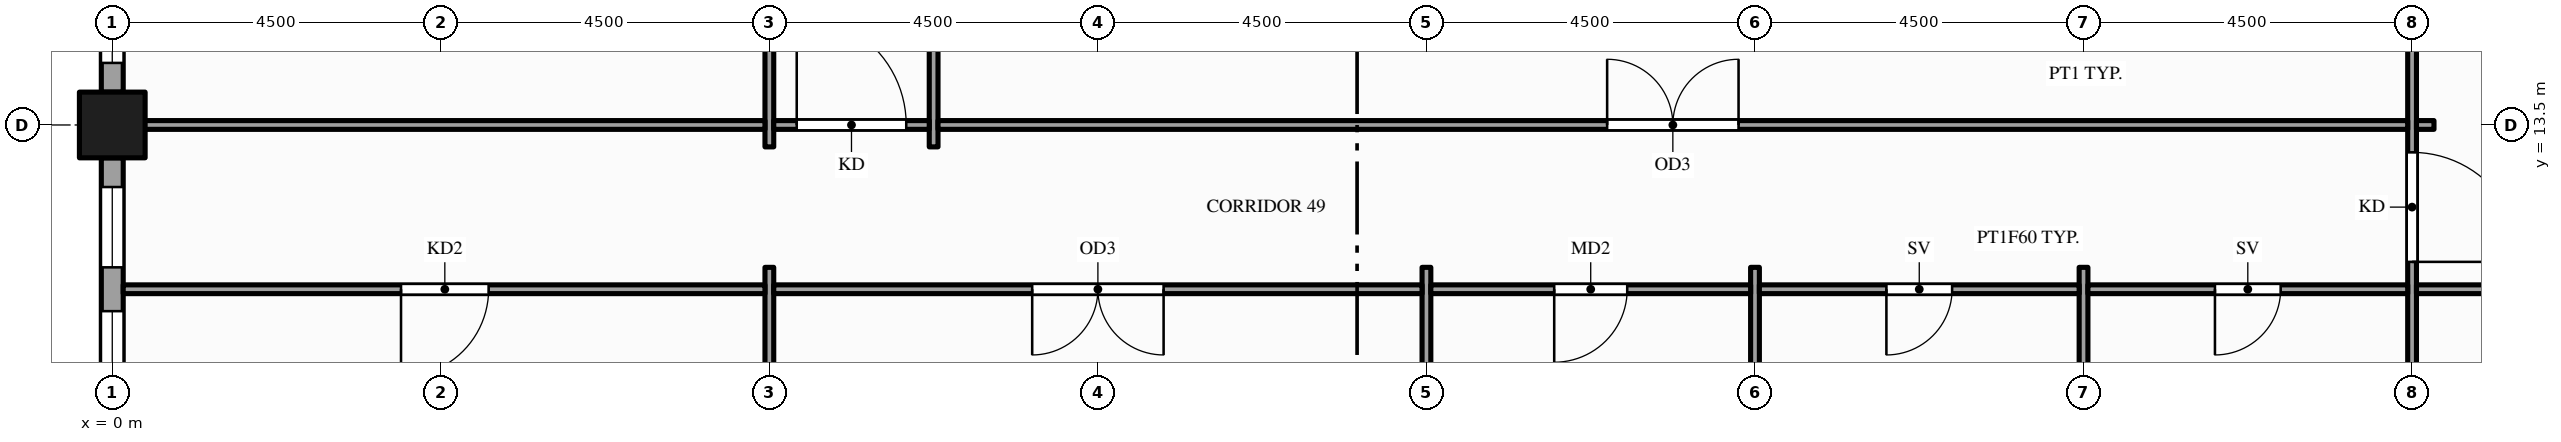
"""IFC4 building model, lengths in metres.
Left out: names, types, materials, properties, quantities, classifications, styles, units other than length and angle.
Written with IfcOpenShell. Run it as: python <this file> out.ifc"""

import sys

from ifc_helpers import new_model, si_unit, direction, frame, frame_2d, origin, origin_2d, place, context, subcontext, project, spatial, rectangle, hollow_rectangle, extrude, element, fill, save


model = new_model("IFC4")
c1 = context("Model", 3, precision=1e-05, world=origin(), true_north=direction((0.0, 1.0)))
c2 = subcontext(c1, "Body", "Model", "MODEL_VIEW")
j1 = project(units=[si_unit("LENGTHUNIT", "METRE"), si_unit("PLANEANGLEUNIT", "RADIAN")], contexts=[c1])
p1 = place(None, origin())
s1 = spatial("IfcSite", under=j1, at=p1, CompositionType="ELEMENT")
p2 = place(p1, origin())
s2 = spatial("IfcBuilding", under=s1, at=p2, CompositionType="ELEMENT")
p3 = place(p2, frame((0.0, 0.0, 155.0)))
s3 = spatial("IfcBuildingStorey", under=s2, at=p3, CompositionType="ELEMENT", Elevation=155.0)
p4 = place(p3, frame((0.0, 13.5, -0.15), z_axis=(0.0, 0.0, 1.0), x_axis=(1.0, 0.0, 0.0)))
e1 = element("IfcColumn", 1, at=p4, inside=s3, PredefinedType="COLUMN", context=c2, shape_type="SweptSolid", body=[
    extrude(hollow_rectangle(XDim=0.9, YDim=0.9, WallThickness=0.045, at=origin_2d()), origin(), (0.0, 0.0, 1.0), 4.0),
])
p5 = place(p3, frame((0.0, 17.55, 0.0), z_axis=(0.0, 0.0, 1.0), x_axis=(0.0, -1.0, 0.0)))
e2 = element("IfcWall", 2, at=p5, inside=s3, PredefinedType="STANDARD", context=c2, shape_type="SweptSolid", body=[
    extrude(rectangle(XDim=3.6, YDim=0.3, at=frame_2d((1.8, 0.0))), origin(), (0.0, 0.0, 1.0), 3.149),
])
p6 = place(p5, frame((0.4, 0.0, 0.9)))
e3 = element("IfcOpeningElement", 3, at=p6, cuts=e2, PredefinedType="OPENING", context=c2, shape_type="SweptSolid", body=[
    extrude(rectangle(XDim=1.1, YDim=2.0, at=frame_2d((0.55, 1.0))), frame((0.0, 0.16, 0.0), z_axis=(0.0, -1.0, 0.0), x_axis=(1.0, 0.0, 0.0)), (0.0, 0.0, 1.0), 0.32),
])
p7 = place(p5, frame((2.1, 0.0, 0.9)))
e4 = element("IfcOpeningElement", 4, at=p7, cuts=e2, PredefinedType="OPENING", context=c2, shape_type="SweptSolid", body=[
    extrude(rectangle(XDim=1.1, YDim=2.0, at=frame_2d((0.55, 1.0))), frame((0.0, 0.16, 0.0), z_axis=(0.0, -1.0, 0.0), x_axis=(1.0, 0.0, 0.0)), (0.0, 0.0, 1.0), 0.32),
])
p8 = place(p3, frame((0.0, 13.05, 0.0), z_axis=(0.0, 0.0, 1.0), x_axis=(0.0, -1.0, 0.0)))
e5 = element("IfcWall", 5, at=p8, inside=s3, PredefinedType="STANDARD", context=c2, shape_type="SweptSolid", body=[
    extrude(rectangle(XDim=3.6, YDim=0.3, at=frame_2d((1.8, 0.0))), origin(), (0.0, 0.0, 1.0), 3.149),
])
p9 = place(p8, frame((0.4, 0.0, 0.9)))
e6 = element("IfcOpeningElement", 6, at=p9, cuts=e5, PredefinedType="OPENING", context=c2, shape_type="SweptSolid", body=[
    extrude(rectangle(XDim=1.1, YDim=2.0, at=frame_2d((0.55, 1.0))), frame((0.0, 0.16, 0.0), z_axis=(0.0, -1.0, 0.0), x_axis=(1.0, 0.0, 0.0)), (0.0, 0.0, 1.0), 0.32),
])
p10 = place(p8, frame((2.1, 0.0, 0.9)))
e7 = element("IfcOpeningElement", 7, at=p10, cuts=e5, PredefinedType="OPENING", context=c2, shape_type="SweptSolid", body=[
    extrude(rectangle(XDim=1.1, YDim=2.0, at=frame_2d((0.55, 1.0))), frame((0.0, 0.16, 0.0), z_axis=(0.0, -1.0, 0.0), x_axis=(1.0, 0.0, 0.0)), (0.0, 0.0, 1.0), 0.32),
])
p11 = place(p3, frame((9.0, 3.875, 0.0), z_axis=(0.0, 0.0, 1.0), x_axis=(0.0, 1.0, 0.0)))
e8 = element("IfcWall", 8, at=p11, inside=s3, PredefinedType="PARTITIONING", context=c2, shape_type="SweptSolid", body=[
    extrude(rectangle(XDim=7.675, YDim=0.12, at=frame_2d((3.837, 0.0))), origin(), (0.0, 0.0, 1.0), 2.87),
])
p12 = place(p3, frame((9.0, 13.2, 0.0), z_axis=(0.0, 0.0, 1.0), x_axis=(0.0, 1.0, 0.0)))
e9 = element("IfcWall", 9, at=p12, inside=s3, PredefinedType="PARTITIONING", context=c2, shape_type="SweptSolid", body=[
    extrude(rectangle(XDim=18.6, YDim=0.12, at=frame_2d((9.3, 0.0))), origin(), (0.0, 0.0, 1.0), 2.6),
])
p13 = place(p12, frame((3.175, 0.0, 0.0)))
e10 = element("IfcOpeningElement", 10, at=p13, cuts=e9, PredefinedType="OPENING", context=c2, shape_type="SweptSolid", body=[
    extrude(rectangle(XDim=1.0, YDim=2.1, at=frame_2d((0.5, 1.05))), frame((0.0, 0.07, 0.0), z_axis=(0.0, -1.0, 0.0), x_axis=(1.0, 0.0, 0.0)), (0.0, 0.0, 1.0), 0.14),
])
p14 = place(p12, frame((9.955, 0.0, 0.0)))
e11 = element("IfcOpeningElement", 11, at=p14, cuts=e9, PredefinedType="OPENING", context=c2, shape_type="SweptSolid", body=[
    extrude(rectangle(XDim=1.0, YDim=2.1, at=frame_2d((0.5, 1.05))), frame((0.0, 0.07, 0.0), z_axis=(0.0, -1.0, 0.0), x_axis=(1.0, 0.0, 0.0)), (0.0, 0.0, 1.0), 0.14),
])
p15 = place(p3, frame((11.25, 13.2, 0.0), z_axis=(0.0, 0.0, 1.0), x_axis=(0.0, 1.0, 0.0)))
e12 = element("IfcWall", 12, at=p15, inside=s3, PredefinedType="PARTITIONING", context=c2, shape_type="SweptSolid", body=[
    extrude(rectangle(XDim=18.6, YDim=0.12, at=frame_2d((9.3, 0.0))), origin(), (0.0, 0.0, 1.0), 2.6),
])
p16 = place(p15, frame((4.2, 0.0, 0.0)))
e13 = element("IfcOpeningElement", 13, at=p16, cuts=e12, PredefinedType="OPENING", context=c2, shape_type="SweptSolid", body=[
    extrude(rectangle(XDim=1.2, YDim=2.1, at=frame_2d((0.6, 1.05))), frame((0.0, 0.07, 0.0), z_axis=(0.0, -1.0, 0.0), x_axis=(1.0, 0.0, 0.0)), (0.0, 0.0, 1.0), 0.14),
])
p17 = place(p3, frame((18.0, 0.15, 0.0), z_axis=(0.0, 0.0, 1.0), x_axis=(0.0, 1.0, 0.0)))
e14 = element("IfcWall", 14, at=p17, inside=s3, PredefinedType="PARTITIONING", context=c2, shape_type="SweptSolid", body=[
    extrude(rectangle(XDim=11.4, YDim=0.12, at=frame_2d((5.7, 0.0))), origin(), (0.0, 0.0, 1.0), 2.87),
])
for number, where, z_axis, x_axis in (
    (15, (22.5, 1.65, 0.0), (0.0, 0.0, 1.0), (0.0, 1.0, 0.0)),
    (16, (27.0, 1.65, 0.0), (0.0, 0.0, 1.0), (0.0, 1.0, 0.0)),
):
    element("IfcWall", number, at=place(p3, frame(where, z_axis=z_axis, x_axis=x_axis)), inside=s3, PredefinedType="PARTITIONING", context=c2, shape_type="SweptSolid", body=[
        extrude(rectangle(XDim=9.9, YDim=0.12, at=frame_2d((4.95, 0.0))), origin(), (0.0, 0.0, 1.0), 2.87),
    ])
p18 = place(p3, frame((31.5, 1.65, 0.0), z_axis=(0.0, 0.0, 1.0), x_axis=(0.0, 1.0, 0.0)))
e17 = element("IfcWall", 17, at=p18, inside=s3, PredefinedType="PARTITIONING", context=c2, shape_type="SweptSolid", body=[
    extrude(rectangle(XDim=22.2, YDim=0.12, at=frame_2d((11.1, 0.0))), origin(), (0.0, 0.0, 1.0), 2.87),
])
p19 = place(p18, frame((9.975, 0.0, 0.0)))
e18 = element("IfcOpeningElement", 18, at=p19, cuts=e17, PredefinedType="OPENING", context=c2, shape_type="SweptSolid", body=[
    extrude(rectangle(XDim=1.5, YDim=2.1, at=frame_2d((0.75, 1.05))), frame((0.0, 0.07, 0.0), z_axis=(0.0, -1.0, 0.0), x_axis=(1.0, 0.0, 0.0)), (0.0, 0.0, 1.0), 0.14),
])
p20 = place(p3, frame((0.15, 11.25, 0.0), z_axis=(0.0, 0.0, 1.0), x_axis=(1.0, 0.0, 0.0)))
e19 = element("IfcWall", 19, at=p20, inside=s3, PredefinedType="PARTITIONING", context=c2, shape_type="SweptSolid", body=[
    extrude(rectangle(XDim=8.79, YDim=0.12, at=frame_2d((4.395, 0.0))), origin(), (0.0, 0.0, 1.0), 2.87),
])
p21 = place(p20, frame((3.805, 0.0, 0.0)))
e20 = element("IfcOpeningElement", 20, at=p21, cuts=e19, PredefinedType="OPENING", context=c2, shape_type="SweptSolid", body=[
    extrude(rectangle(XDim=1.2, YDim=2.1, at=frame_2d((0.6, 1.05))), frame((0.0, 0.07, 0.0), z_axis=(0.0, -1.0, 0.0), x_axis=(1.0, 0.0, 0.0)), (0.0, 0.0, 1.0), 0.14),
])
p22 = place(p3, frame((9.06, 11.25, 0.0), z_axis=(0.0, 0.0, 1.0), x_axis=(1.0, 0.0, 0.0)))
e21 = element("IfcWall", 21, at=p22, inside=s3, PredefinedType="PARTITIONING", context=c2, shape_type="SweptSolid", body=[
    extrude(rectangle(XDim=8.88, YDim=0.12, at=frame_2d((4.44, 0.0))), origin(), (0.0, 0.0, 1.0), 2.87),
])
p23 = place(p22, frame((3.54, 0.0, 0.0)))
e22 = element("IfcOpeningElement", 22, at=p23, cuts=e21, PredefinedType="OPENING", context=c2, shape_type="SweptSolid", body=[
    extrude(rectangle(XDim=1.8, YDim=2.1, at=frame_2d((0.9, 1.05))), frame((0.0, 0.07, 0.0), z_axis=(0.0, -1.0, 0.0), x_axis=(1.0, 0.0, 0.0)), (0.0, 0.0, 1.0), 0.14),
])
p24 = place(p3, frame((18.06, 11.25, 0.0), z_axis=(0.0, 0.0, 1.0), x_axis=(1.0, 0.0, 0.0)))
e23 = element("IfcWall", 23, at=p24, inside=s3, PredefinedType="PARTITIONING", context=c2, shape_type="SweptSolid", body=[
    extrude(rectangle(XDim=4.38, YDim=0.12, at=frame_2d((2.19, 0.0))), origin(), (0.0, 0.0, 1.0), 2.87),
])
p25 = place(p24, frame((1.69, 0.0, 0.0)))
e24 = element("IfcOpeningElement", 24, at=p25, cuts=e23, PredefinedType="OPENING", context=c2, shape_type="SweptSolid", body=[
    extrude(rectangle(XDim=1.0, YDim=2.1, at=frame_2d((0.5, 1.05))), frame((0.0, 0.07, 0.0), z_axis=(0.0, -1.0, 0.0), x_axis=(1.0, 0.0, 0.0)), (0.0, 0.0, 1.0), 0.14),
])
p26 = place(p3, frame((22.56, 11.25, 0.0), z_axis=(0.0, 0.0, 1.0), x_axis=(1.0, 0.0, 0.0)))
e25 = element("IfcWall", 25, at=p26, inside=s3, PredefinedType="PARTITIONING", context=c2, shape_type="SweptSolid", body=[
    extrude(rectangle(XDim=4.38, YDim=0.12, at=frame_2d((2.19, 0.0))), origin(), (0.0, 0.0, 1.0), 2.87),
])
p27 = place(p26, frame((1.74, 0.0, 0.0)))
e26 = element("IfcOpeningElement", 26, at=p27, cuts=e25, PredefinedType="OPENING", context=c2, shape_type="SweptSolid", body=[
    extrude(rectangle(XDim=0.9, YDim=2.1, at=frame_2d((0.45, 1.05))), frame((0.0, 0.07, 0.0), z_axis=(0.0, -1.0, 0.0), x_axis=(1.0, 0.0, 0.0)), (0.0, 0.0, 1.0), 0.14),
])
p28 = place(p3, frame((27.06, 11.25, 0.0), z_axis=(0.0, 0.0, 1.0), x_axis=(1.0, 0.0, 0.0)))
e27 = element("IfcWall", 27, at=p28, inside=s3, PredefinedType="PARTITIONING", context=c2, shape_type="SweptSolid", body=[
    extrude(rectangle(XDim=4.38, YDim=0.12, at=frame_2d((2.19, 0.0))), origin(), (0.0, 0.0, 1.0), 2.87),
])
p29 = place(p28, frame((1.74, 0.0, 0.0)))
e28 = element("IfcOpeningElement", 28, at=p29, cuts=e27, PredefinedType="OPENING", context=c2, shape_type="SweptSolid", body=[
    extrude(rectangle(XDim=0.9, YDim=2.1, at=frame_2d((0.45, 1.05))), frame((0.0, 0.07, 0.0), z_axis=(0.0, -1.0, 0.0), x_axis=(1.0, 0.0, 0.0)), (0.0, 0.0, 1.0), 0.14),
])
p30 = place(p3, frame((31.56, 11.25, 0.0), z_axis=(0.0, 0.0, 1.0), x_axis=(1.0, 0.0, 0.0)))
e29 = element("IfcWall", 29, at=p30, inside=s3, PredefinedType="PARTITIONING", context=c2, shape_type="SweptSolid", body=[
    extrude(rectangle(XDim=6.63, YDim=0.12, at=frame_2d((3.315, 0.0))), origin(), (0.0, 0.0, 1.0), 2.87),
])
p31 = place(p30, frame((2.815, 0.0, 0.0)))
e30 = element("IfcOpeningElement", 30, at=p31, cuts=e29, PredefinedType="OPENING", context=c2, shape_type="SweptSolid", body=[
    extrude(rectangle(XDim=1.0, YDim=2.1, at=frame_2d((0.5, 1.05))), frame((0.0, 0.07, 0.0), z_axis=(0.0, -1.0, 0.0), x_axis=(1.0, 0.0, 0.0)), (0.0, 0.0, 1.0), 0.14),
])
p32 = place(p3, frame((0.15, 13.5, 0.0), z_axis=(0.0, 0.0, 1.0), x_axis=(1.0, 0.0, 0.0)))
e31 = element("IfcWall", 31, at=p32, inside=s3, PredefinedType="PARTITIONING", context=c2, shape_type="SweptSolid", body=[
    extrude(rectangle(XDim=8.79, YDim=0.12, at=frame_2d((4.395, 0.0))), origin(), (0.0, 0.0, 1.0), 2.87),
])
p33 = place(p3, frame((9.06, 13.5, 0.0), z_axis=(0.0, 0.0, 1.0), x_axis=(1.0, 0.0, 0.0)))
e32 = element("IfcWall", 32, at=p33, inside=s3, PredefinedType="PARTITIONING", context=c2, shape_type="SweptSolid", body=[
    extrude(rectangle(XDim=2.13, YDim=0.12, at=frame_2d((1.065, 0.0))), origin(), (0.0, 0.0, 1.0), 2.87),
])
p34 = place(p33, frame((0.315, 0.0, 0.0)))
e33 = element("IfcOpeningElement", 33, at=p34, cuts=e32, PredefinedType="OPENING", context=c2, shape_type="SweptSolid", body=[
    extrude(rectangle(XDim=1.5, YDim=2.1, at=frame_2d((0.75, 1.05))), frame((0.0, 0.07, 0.0), z_axis=(0.0, -1.0, 0.0), x_axis=(1.0, 0.0, 0.0)), (0.0, 0.0, 1.0), 0.14),
])
p35 = place(p3, frame((11.31, 13.5, 0.0), z_axis=(0.0, 0.0, 1.0), x_axis=(1.0, 0.0, 0.0)))
e34 = element("IfcWall", 34, at=p35, inside=s3, PredefinedType="PARTITIONING", context=c2, shape_type="SweptSolid", body=[
    extrude(rectangle(XDim=20.13, YDim=0.12, at=frame_2d((10.065, 0.0))), origin(), (0.0, 0.0, 1.0), 2.87),
])
p36 = place(p35, frame((9.165, 0.0, 0.0)))
e35 = element("IfcOpeningElement", 35, at=p36, cuts=e34, PredefinedType="OPENING", context=c2, shape_type="SweptSolid", body=[
    extrude(rectangle(XDim=1.8, YDim=2.1, at=frame_2d((0.9, 1.05))), frame((0.0, 0.07, 0.0), z_axis=(0.0, -1.0, 0.0), x_axis=(1.0, 0.0, 0.0)), (0.0, 0.0, 1.0), 0.14),
])
p37 = place(p3, frame((31.56, 13.5, 0.0), z_axis=(0.0, 0.0, 1.0), x_axis=(1.0, 0.0, 0.0)))
e36 = element("IfcWall", 36, at=p37, inside=s3, PredefinedType="PARTITIONING", context=c2, shape_type="SweptSolid", body=[
    extrude(rectangle(XDim=0.24, YDim=0.12, at=frame_2d((0.12, 0.0))), origin(), (0.0, 0.0, 1.0), 2.87),
])
p38 = place(p7, origin())
e37 = element("IfcWindow", 37, at=p38, inside=s3, PartitioningType="SINGLE_PANEL", PredefinedType="WINDOW", context=c2, shape_type="SweptSolid", body=[
    extrude(rectangle(XDim=1.1, YDim=2.0, at=frame_2d((0.55, 1.0))), frame((0.0, 0.03, 0.0), z_axis=(0.0, -1.0, 0.0), x_axis=(1.0, 0.0, 0.0)), (0.0, 0.0, 1.0), 0.06),
])
fill(e4, e37)
p39 = place(p9, origin())
e38 = element("IfcWindow", 38, at=p39, inside=s3, PartitioningType="SINGLE_PANEL", PredefinedType="WINDOW", context=c2, shape_type="SweptSolid", body=[
    extrude(rectangle(XDim=1.1, YDim=2.0, at=frame_2d((0.55, 1.0))), frame((0.0, 0.03, 0.0), z_axis=(0.0, -1.0, 0.0), x_axis=(1.0, 0.0, 0.0)), (0.0, 0.0, 1.0), 0.06),
])
fill(e6, e38)
p40 = place(p10, origin())
e39 = element("IfcWindow", 39, at=p40, inside=s3, PartitioningType="SINGLE_PANEL", PredefinedType="WINDOW", context=c2, shape_type="SweptSolid", body=[
    extrude(rectangle(XDim=1.1, YDim=2.0, at=frame_2d((0.55, 1.0))), frame((0.0, 0.03, 0.0), z_axis=(0.0, -1.0, 0.0), x_axis=(1.0, 0.0, 0.0)), (0.0, 0.0, 1.0), 0.06),
])
fill(e7, e39)
p41 = place(p19, origin())
e40 = element("IfcDoor", 40, at=p41, inside=s3, OperationType="SINGLE_SWING_LEFT", PredefinedType="DOOR", context=c2, shape_type="SweptSolid", body=[
    extrude(rectangle(XDim=1.5, YDim=2.1, at=frame_2d((0.75, 1.05))), frame((0.0, 0.025, 0.0), z_axis=(0.0, -1.0, 0.0), x_axis=(1.0, 0.0, 0.0)), (0.0, 0.0, 1.0), 0.05),
])
fill(e18, e40)
p42 = place(p21, origin())
e41 = element("IfcDoor", 41, at=p42, inside=s3, OperationType="SINGLE_SWING_LEFT", PredefinedType="DOOR", context=c2, shape_type="SweptSolid", body=[
    extrude(rectangle(XDim=1.2, YDim=2.1, at=frame_2d((0.6, 1.05))), frame((0.0, 0.025, 0.0), z_axis=(0.0, -1.0, 0.0), x_axis=(1.0, 0.0, 0.0)), (0.0, 0.0, 1.0), 0.05),
])
fill(e20, e41)
p43 = place(p23, origin())
e42 = element("IfcDoor", 42, at=p43, inside=s3, OperationType="DOUBLE_DOOR_SINGLE_SWING", PredefinedType="DOOR", context=c2, shape_type="SweptSolid", body=[
    extrude(rectangle(XDim=1.8, YDim=2.1, at=frame_2d((0.9, 1.05))), frame((0.0, 0.025, 0.0), z_axis=(0.0, -1.0, 0.0), x_axis=(1.0, 0.0, 0.0)), (0.0, 0.0, 1.0), 0.05),
])
fill(e22, e42)
p44 = place(p25, origin())
e43 = element("IfcDoor", 43, at=p44, inside=s3, OperationType="SINGLE_SWING_LEFT", PredefinedType="DOOR", context=c2, shape_type="SweptSolid", body=[
    extrude(rectangle(XDim=1.0, YDim=2.1, at=frame_2d((0.5, 1.05))), frame((0.0, 0.025, 0.0), z_axis=(0.0, -1.0, 0.0), x_axis=(1.0, 0.0, 0.0)), (0.0, 0.0, 1.0), 0.05),
])
fill(e24, e43)
p45 = place(p27, origin())
e44 = element("IfcDoor", 44, at=p45, inside=s3, OperationType="SINGLE_SWING_LEFT", PredefinedType="DOOR", context=c2, shape_type="SweptSolid", body=[
    extrude(rectangle(XDim=0.9, YDim=2.1, at=frame_2d((0.45, 1.05))), frame((0.0, 0.025, 0.0), z_axis=(0.0, -1.0, 0.0), x_axis=(1.0, 0.0, 0.0)), (0.0, 0.0, 1.0), 0.05),
])
fill(e26, e44)
p46 = place(p29, origin())
e45 = element("IfcDoor", 45, at=p46, inside=s3, OperationType="SINGLE_SWING_LEFT", PredefinedType="DOOR", context=c2, shape_type="SweptSolid", body=[
    extrude(rectangle(XDim=0.9, YDim=2.1, at=frame_2d((0.45, 1.05))), frame((0.0, 0.025, 0.0), z_axis=(0.0, -1.0, 0.0), x_axis=(1.0, 0.0, 0.0)), (0.0, 0.0, 1.0), 0.05),
])
fill(e28, e45)
p47 = place(p36, origin())
e46 = element("IfcDoor", 46, at=p47, inside=s3, OperationType="DOUBLE_DOOR_SINGLE_SWING", PredefinedType="DOOR", context=c2, shape_type="SweptSolid", body=[
    extrude(rectangle(XDim=1.8, YDim=2.1, at=frame_2d((0.9, 1.05))), frame((0.0, 0.025, 0.0), z_axis=(0.0, -1.0, 0.0), x_axis=(1.0, 0.0, 0.0)), (0.0, 0.0, 1.0), 0.05),
])
fill(e35, e46)
p48 = place(p34, origin())
e47 = element("IfcDoor", 47, at=p48, inside=s3, OperationType="SINGLE_SWING_LEFT", PredefinedType="DOOR", context=c2, shape_type="SweptSolid", body=[
    extrude(rectangle(XDim=1.5, YDim=2.1, at=frame_2d((0.75, 1.05))), frame((0.0, 0.025, 0.0), z_axis=(0.0, -1.0, 0.0), x_axis=(1.0, 0.0, 0.0)), (0.0, 0.0, 1.0), 0.05),
])
fill(e33, e47)
save(model, sys.argv[1])
